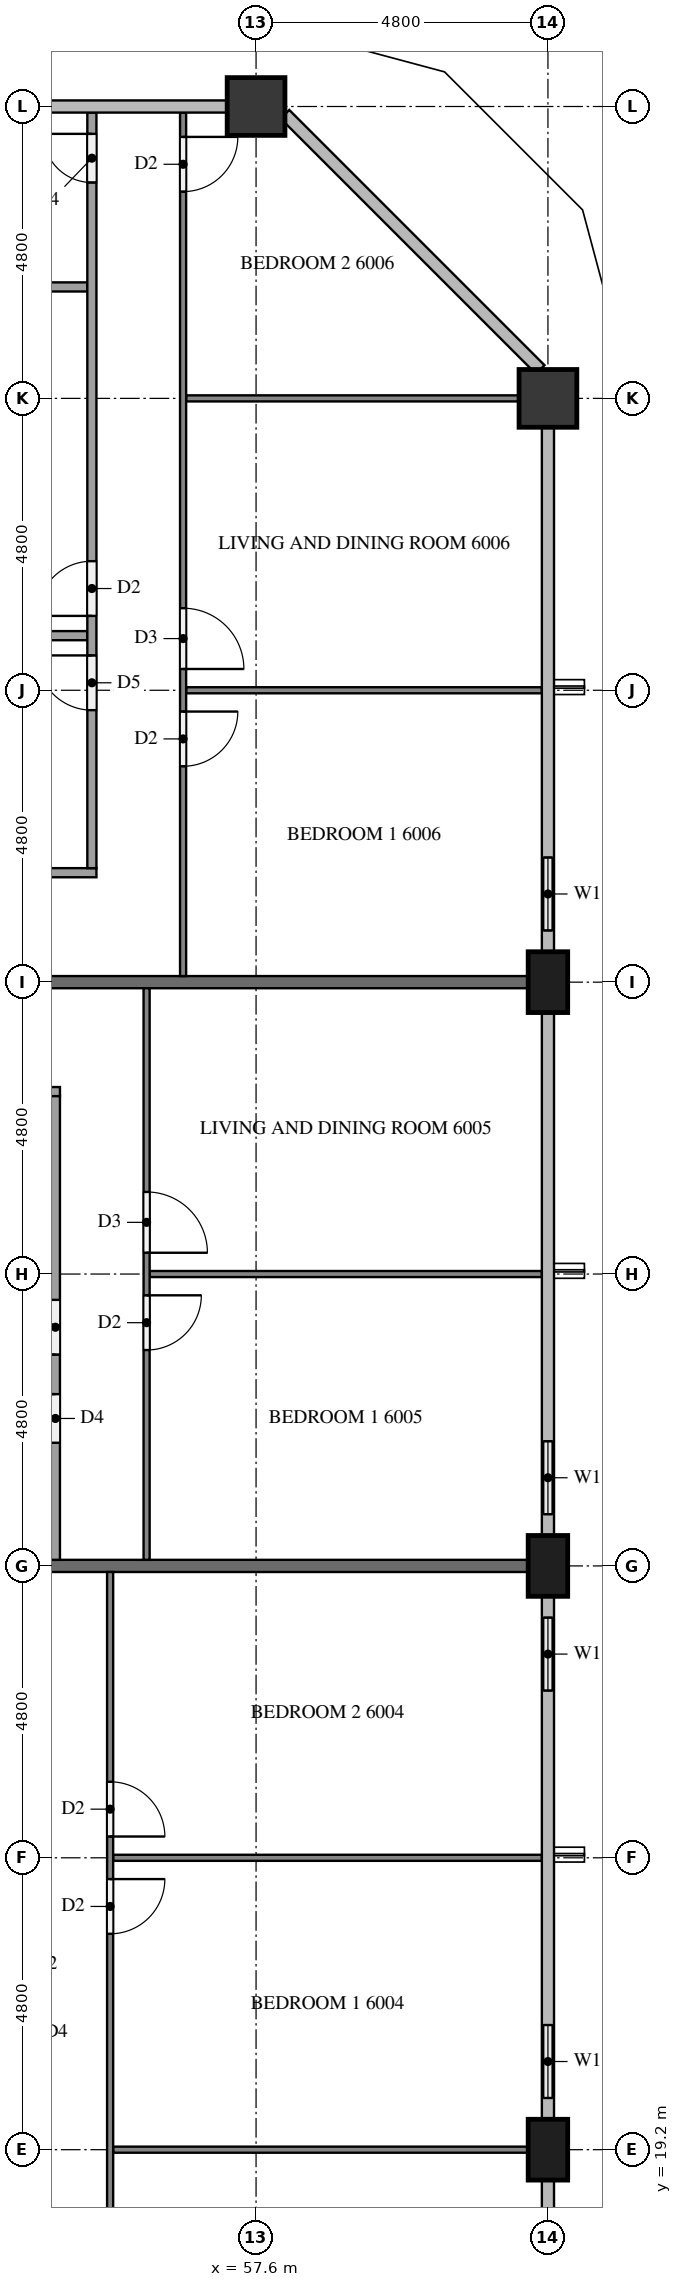
"""IFC4 building model, lengths in metres.
Left out: names, types, materials, properties, quantities, classifications, styles, units other than length and angle.
Written with IfcOpenShell. Run it as: python <this file> out.ifc"""

import sys

from ifc_helpers import new_model, si_unit, direction, frame, frame_2d, origin, origin_2d, place, context, subcontext, project, spatial, rectangle, extrude, element, fill, save


model = new_model("IFC4")
c1 = context("Model", 3, precision=1e-05, world=origin(), true_north=direction((0.0, 1.0)))
c2 = subcontext(c1, "Body", "Model", "MODEL_VIEW")
j1 = project(units=[si_unit("LENGTHUNIT", "METRE"), si_unit("PLANEANGLEUNIT", "RADIAN")], contexts=[c1])
p1 = place(None, origin())
s1 = spatial("IfcSite", under=j1, at=p1, CompositionType="ELEMENT")
p2 = place(p1, origin())
s2 = spatial("IfcBuilding", under=s1, at=p2, CompositionType="ELEMENT")
p3 = place(p2, frame((0.0, 0.0, 229.8)))
s3 = spatial("IfcBuildingStorey", under=s2, at=p3, CompositionType="ELEMENT", Elevation=229.8)
for number, where, z_axis, x_axis in (
    (1, (62.4, 19.2, 0.0), (0.0, 0.0, 1.0), (0.0, 1.0, 0.0)),
    (2, (62.4, 28.8, 0.0), (0.0, 0.0, 1.0), (0.0, 1.0, 0.0)),
    (3, (62.4, 38.4, 0.0), (0.0, 0.0, 1.0), (0.0, 1.0, 0.0)),
):
    element("IfcColumn", number, at=place(p3, frame(where, z_axis=z_axis, x_axis=x_axis)), inside=s3, PredefinedType="COLUMN", context=c2, shape_type="SweptSolid", body=[
        extrude(rectangle(XDim=1.0, YDim=0.65, at=origin_2d()), origin(), (0.0, 0.0, 1.0), 3.1),
    ])
for number, where, z_axis, x_axis in (
    (4, (62.4, 48.0, 0.0), (0.0, 0.0, 1.0), (1.0, 0.0, 0.0)),
    (5, (57.6, 52.8, 0.0), (0.0, 0.0, 1.0), (1.0, 0.0, 0.0)),
):
    element("IfcColumn", number, at=place(p3, frame(where, z_axis=z_axis, x_axis=x_axis)), inside=s3, PredefinedType="COLUMN", context=c2, shape_type="SweptSolid", body=[
        extrude(rectangle(XDim=0.95, YDim=0.95, at=origin_2d()), origin(), (0.0, 0.0, 1.0), 3.1),
    ])
p4 = place(p3, frame((62.4, 19.7, 0.0), z_axis=(0.0, 0.0, 1.0), x_axis=(0.0, 1.0, 0.0)))
e6 = element("IfcWall", 6, at=p4, inside=s3, PredefinedType="SOLIDWALL", context=c2, shape_type="SweptSolid", body=[
    extrude(rectangle(XDim=1.9, YDim=0.15, at=frame_2d((0.95, 0.0))), origin(), (0.0, 0.0, 1.0), 3.1),
])
p5 = place(p4, frame((0.35, 0.0, 0.9)))
e7 = element("IfcOpeningElement", 7, at=p5, cuts=e6, PredefinedType="OPENING", context=c2, shape_type="SweptSolid", body=[
    extrude(rectangle(XDim=1.2, YDim=1.4, at=frame_2d((0.6, 0.7))), frame((0.0, 0.085, 0.0), z_axis=(0.0, -1.0, 0.0), x_axis=(1.0, 0.0, 0.0)), (0.0, 0.0, 1.0), 0.17),
])
p6 = place(p3, frame((62.4, 26.4, 0.0), z_axis=(0.0, 0.0, 1.0), x_axis=(0.0, 1.0, 0.0)))
e8 = element("IfcWall", 8, at=p6, inside=s3, PredefinedType="SOLIDWALL", context=c2, shape_type="SweptSolid", body=[
    extrude(rectangle(XDim=1.9, YDim=0.15, at=frame_2d((0.95, 0.0))), origin(), (0.0, 0.0, 1.0), 3.1),
])
p7 = place(p6, frame((0.35, 0.0, 0.9)))
e9 = element("IfcOpeningElement", 9, at=p7, cuts=e8, PredefinedType="OPENING", context=c2, shape_type="SweptSolid", body=[
    extrude(rectangle(XDim=1.2, YDim=1.4, at=frame_2d((0.6, 0.7))), frame((0.0, 0.085, 0.0), z_axis=(0.0, -1.0, 0.0), x_axis=(1.0, 0.0, 0.0)), (0.0, 0.0, 1.0), 0.17),
])
p8 = place(p3, frame((62.4, 29.3, 0.0), z_axis=(0.0, 0.0, 1.0), x_axis=(0.0, 1.0, 0.0)))
e10 = element("IfcWall", 10, at=p8, inside=s3, PredefinedType="SOLIDWALL", context=c2, shape_type="SweptSolid", body=[
    extrude(rectangle(XDim=1.9, YDim=0.15, at=frame_2d((0.95, 0.0))), origin(), (0.0, 0.0, 1.0), 3.1),
])
p9 = place(p8, frame((0.35, 0.0, 0.9)))
e11 = element("IfcOpeningElement", 11, at=p9, cuts=e10, PredefinedType="OPENING", context=c2, shape_type="SweptSolid", body=[
    extrude(rectangle(XDim=1.2, YDim=1.4, at=frame_2d((0.6, 0.7))), frame((0.0, 0.085, 0.0), z_axis=(0.0, -1.0, 0.0), x_axis=(1.0, 0.0, 0.0)), (0.0, 0.0, 1.0), 0.17),
])
p10 = place(p3, frame((62.4, 38.9, 0.0), z_axis=(0.0, 0.0, 1.0), x_axis=(0.0, 1.0, 0.0)))
e12 = element("IfcWall", 12, at=p10, inside=s3, PredefinedType="SOLIDWALL", context=c2, shape_type="SweptSolid", body=[
    extrude(rectangle(XDim=1.9, YDim=0.15, at=frame_2d((0.95, 0.0))), origin(), (0.0, 0.0, 1.0), 3.1),
])
p11 = place(p10, frame((0.35, 0.0, 0.9)))
e13 = element("IfcOpeningElement", 13, at=p11, cuts=e12, PredefinedType="OPENING", context=c2, shape_type="SweptSolid", body=[
    extrude(rectangle(XDim=1.2, YDim=1.4, at=frame_2d((0.6, 0.7))), frame((0.0, 0.085, 0.0), z_axis=(0.0, -1.0, 0.0), x_axis=(1.0, 0.0, 0.0)), (0.0, 0.0, 1.0), 0.17),
])
for number, where, z_axis, x_axis in (
    (14, (50.5, 28.8, 0.0), (0.0, 0.0, 1.0), (1.0, 0.0, 0.0)),
    (15, (50.5, 38.4, 0.0), (0.0, 0.0, 1.0), (1.0, 0.0, 0.0)),
):
    element("IfcWall", number, at=place(p3, frame(where, z_axis=z_axis, x_axis=x_axis)), inside=s3, PredefinedType="PARTITIONING", context=c2, shape_type="SweptSolid", body=[
        extrude(rectangle(XDim=11.575, YDim=0.2, at=frame_2d((5.788, 0.0))), origin(), (0.0, 0.0, 1.0), 3.1),
    ])
p12 = place(p3, frame((55.25, 19.2, 0.0), z_axis=(0.0, 0.0, 1.0), x_axis=(1.0, 0.0, 0.0)))
e16 = element("IfcWall", 16, at=p12, inside=s3, PredefinedType="PARTITIONING", context=c2, shape_type="SweptSolid", body=[
    extrude(rectangle(XDim=6.825, YDim=0.1, at=frame_2d((3.413, 0.0))), origin(), (0.0, 0.0, 1.0), 3.1),
])
p13 = place(p3, frame((55.25, 24.0, 0.0), z_axis=(0.0, 0.0, 1.0), x_axis=(1.0, 0.0, 0.0)))
e17 = element("IfcWall", 17, at=p13, inside=s3, PredefinedType="PARTITIONING", context=c2, shape_type="SweptSolid", body=[
    extrude(rectangle(XDim=7.05, YDim=0.1, at=frame_2d((3.525, 0.0))), origin(), (0.0, 0.0, 1.0), 3.1),
])
p14 = place(p3, frame((55.2, 28.7, 0.0), z_axis=(0.0, 0.0, 1.0), x_axis=(0.0, -1.0, 0.0)))
e18 = element("IfcWall", 18, at=p14, inside=s3, PredefinedType="PARTITIONING", context=c2, shape_type="SweptSolid", body=[
    extrude(rectangle(XDim=16.6, YDim=0.1, at=frame_2d((8.3, 0.0))), origin(), (0.0, 0.0, 1.0), 3.1),
])
p15 = place(p14, frame((15.3, 0.0, 0.0)))
e19 = element("IfcOpeningElement", 19, at=p15, cuts=e18, PredefinedType="OPENING", context=c2, shape_type="SweptSolid", body=[
    extrude(rectangle(XDim=1.0, YDim=2.1, at=frame_2d((0.5, 1.05))), frame((0.0, 0.06, 0.0), z_axis=(0.0, -1.0, 0.0), x_axis=(1.0, 0.0, 0.0)), (0.0, 0.0, 1.0), 0.12),
])
p16 = place(p14, frame((5.05, 0.0, 0.0)))
e20 = element("IfcOpeningElement", 20, at=p16, cuts=e18, PredefinedType="OPENING", context=c2, shape_type="SweptSolid", body=[
    extrude(rectangle(XDim=0.9, YDim=2.1, at=frame_2d((0.45, 1.05))), frame((0.0, 0.06, 0.0), z_axis=(0.0, -1.0, 0.0), x_axis=(1.0, 0.0, 0.0)), (0.0, 0.0, 1.0), 0.12),
])
p17 = place(p14, frame((3.45, 0.0, 0.0)))
e21 = element("IfcOpeningElement", 21, at=p17, cuts=e18, PredefinedType="OPENING", context=c2, shape_type="SweptSolid", body=[
    extrude(rectangle(XDim=0.9, YDim=2.1, at=frame_2d((0.45, 1.05))), frame((0.0, 0.06, 0.0), z_axis=(0.0, -1.0, 0.0), x_axis=(1.0, 0.0, 0.0)), (0.0, 0.0, 1.0), 0.12),
])
p18 = place(p3, frame((55.85, 33.6, 0.0), z_axis=(0.0, 0.0, 1.0), x_axis=(1.0, 0.0, 0.0)))
e22 = element("IfcWall", 22, at=p18, inside=s3, PredefinedType="PARTITIONING", context=c2, shape_type="SweptSolid", body=[
    extrude(rectangle(XDim=6.45, YDim=0.1, at=frame_2d((3.225, 0.0))), origin(), (0.0, 0.0, 1.0), 3.1),
])
p19 = place(p3, frame((55.8, 38.3, 0.0), z_axis=(0.0, 0.0, 1.0), x_axis=(0.0, -1.0, 0.0)))
e23 = element("IfcWall", 23, at=p19, inside=s3, PredefinedType="PARTITIONING", context=c2, shape_type="SweptSolid", body=[
    extrude(rectangle(XDim=9.4, YDim=0.1, at=frame_2d((4.7, 0.0))), origin(), (0.0, 0.0, 1.0), 3.1),
])
p20 = place(p19, frame((3.35, 0.0, 0.0)))
e24 = element("IfcOpeningElement", 24, at=p20, cuts=e23, PredefinedType="OPENING", context=c2, shape_type="SweptSolid", body=[
    extrude(rectangle(XDim=1.0, YDim=2.1, at=frame_2d((0.5, 1.05))), frame((0.0, 0.06, 0.0), z_axis=(0.0, -1.0, 0.0), x_axis=(1.0, 0.0, 0.0)), (0.0, 0.0, 1.0), 0.12),
])
p21 = place(p19, frame((5.05, 0.0, 0.0)))
e25 = element("IfcOpeningElement", 25, at=p21, cuts=e23, PredefinedType="OPENING", context=c2, shape_type="SweptSolid", body=[
    extrude(rectangle(XDim=0.9, YDim=2.1, at=frame_2d((0.45, 1.05))), frame((0.0, 0.06, 0.0), z_axis=(0.0, -1.0, 0.0), x_axis=(1.0, 0.0, 0.0)), (0.0, 0.0, 1.0), 0.12),
])
p22 = place(p3, frame((50.5, 36.6, 0.0), z_axis=(0.0, 0.0, 1.0), x_axis=(1.0, 0.0, 0.0)))
e26 = element("IfcWall", 26, at=p22, inside=s3, PredefinedType="PARTITIONING", context=c2, shape_type="SweptSolid", body=[
    extrude(rectangle(XDim=3.875, YDim=0.15, at=frame_2d((1.938, 0.0))), origin(), (0.0, 0.0, 1.0), 3.1),
])
p23 = place(p3, frame((54.3, 28.9, 0.0), z_axis=(0.0, 0.0, 1.0), x_axis=(0.0, 1.0, 0.0)))
e27 = element("IfcWall", 27, at=p23, inside=s3, PredefinedType="PARTITIONING", context=c2, shape_type="SweptSolid", body=[
    extrude(rectangle(XDim=7.625, YDim=0.15, at=frame_2d((3.812, 0.0))), origin(), (0.0, 0.0, 1.0), 3.1),
])
p24 = place(p23, frame((3.375, 0.0, 0.0)))
e28 = element("IfcOpeningElement", 28, at=p24, cuts=e27, PredefinedType="OPENING", context=c2, shape_type="SweptSolid", body=[
    extrude(rectangle(XDim=0.9, YDim=2.1, at=frame_2d((0.45, 1.05))), frame((0.0, 0.085, 0.0), z_axis=(0.0, -1.0, 0.0), x_axis=(1.0, 0.0, 0.0)), (0.0, 0.0, 1.0), 0.17),
])
p25 = place(p23, frame((1.925, 0.0, 0.0)))
e29 = element("IfcOpeningElement", 29, at=p25, cuts=e27, PredefinedType="OPENING", context=c2, shape_type="SweptSolid", body=[
    extrude(rectangle(XDim=0.8, YDim=2.1, at=frame_2d((0.4, 1.05))), frame((0.0, 0.085, 0.0), z_axis=(0.0, -1.0, 0.0), x_axis=(1.0, 0.0, 0.0)), (0.0, 0.0, 1.0), 0.17),
])
p26 = place(p3, frame((56.45, 43.2, 0.0), z_axis=(0.0, 0.0, 1.0), x_axis=(1.0, 0.0, 0.0)))
e30 = element("IfcWall", 30, at=p26, inside=s3, PredefinedType="PARTITIONING", context=c2, shape_type="SweptSolid", body=[
    extrude(rectangle(XDim=5.85, YDim=0.1, at=frame_2d((2.925, 0.0))), origin(), (0.0, 0.0, 1.0), 3.1),
])
p27 = place(p3, frame((56.45, 48.0, 0.0), z_axis=(0.0, 0.0, 1.0), x_axis=(1.0, 0.0, 0.0)))
e31 = element("IfcWall", 31, at=p27, inside=s3, PredefinedType="PARTITIONING", context=c2, shape_type="SweptSolid", body=[
    extrude(rectangle(XDim=5.475, YDim=0.1, at=frame_2d((2.738, 0.0))), origin(), (0.0, 0.0, 1.0), 3.1),
])
p28 = place(p3, frame((56.4, 52.7, 0.0), z_axis=(0.0, 0.0, 1.0), x_axis=(0.0, -1.0, 0.0)))
e32 = element("IfcWall", 32, at=p28, inside=s3, PredefinedType="PARTITIONING", context=c2, shape_type="SweptSolid", body=[
    extrude(rectangle(XDim=14.2, YDim=0.1, at=frame_2d((7.1, 0.0))), origin(), (0.0, 0.0, 1.0), 3.1),
])
p29 = place(p28, frame((9.85, 0.0, 0.0)))
e33 = element("IfcOpeningElement", 33, at=p29, cuts=e32, PredefinedType="OPENING", context=c2, shape_type="SweptSolid", body=[
    extrude(rectangle(XDim=0.9, YDim=2.1, at=frame_2d((0.45, 1.05))), frame((0.0, 0.06, 0.0), z_axis=(0.0, -1.0, 0.0), x_axis=(1.0, 0.0, 0.0)), (0.0, 0.0, 1.0), 0.12),
])
p30 = place(p28, frame((8.15, 0.0, 0.0)))
e34 = element("IfcOpeningElement", 34, at=p30, cuts=e32, PredefinedType="OPENING", context=c2, shape_type="SweptSolid", body=[
    extrude(rectangle(XDim=1.0, YDim=2.1, at=frame_2d((0.5, 1.05))), frame((0.0, 0.06, 0.0), z_axis=(0.0, -1.0, 0.0), x_axis=(1.0, 0.0, 0.0)), (0.0, 0.0, 1.0), 0.12),
])
p31 = place(p28, frame((0.4, 0.0, 0.0)))
e35 = element("IfcOpeningElement", 35, at=p31, cuts=e32, PredefinedType="OPENING", context=c2, shape_type="SweptSolid", body=[
    extrude(rectangle(XDim=0.9, YDim=2.1, at=frame_2d((0.45, 1.05))), frame((0.0, 0.06, 0.0), z_axis=(0.0, -1.0, 0.0), x_axis=(1.0, 0.0, 0.0)), (0.0, 0.0, 1.0), 0.12),
])
for number, where, z_axis, x_axis in (
    (36, (50.5, 44.098, 0.0), (0.0, 0.0, 1.0), (1.0, 0.0, 0.0)),
    (37, (50.5, 49.833, 0.0), (0.0, 0.0, 1.0), (1.0, 0.0, 0.0)),
):
    element("IfcWall", number, at=place(p3, frame(where, z_axis=z_axis, x_axis=x_axis)), inside=s3, PredefinedType="PARTITIONING", context=c2, shape_type="SweptSolid", body=[
        extrude(rectangle(XDim=4.325, YDim=0.15, at=frame_2d((2.163, 0.0))), origin(), (0.0, 0.0, 1.0), 3.1),
    ])
p32 = place(p3, frame((50.5, 40.2, 0.0), z_axis=(0.0, 0.0, 1.0), x_axis=(1.0, 0.0, 0.0)))
e38 = element("IfcWall", 38, at=p32, inside=s3, PredefinedType="PARTITIONING", context=c2, shape_type="SweptSolid", body=[
    extrude(rectangle(XDim=4.475, YDim=0.15, at=frame_2d((2.238, 0.0))), origin(), (0.0, 0.0, 1.0), 3.1),
])
p33 = place(p3, frame((54.9, 40.275, 0.0), z_axis=(0.0, 0.0, 1.0), x_axis=(0.0, 1.0, 0.0)))
e39 = element("IfcWall", 39, at=p33, inside=s3, PredefinedType="PARTITIONING", context=c2, shape_type="SweptSolid", body=[
    extrude(rectangle(XDim=12.425, YDim=0.15, at=frame_2d((6.212, 0.0))), origin(), (0.0, 0.0, 1.0), 3.1),
])
p34 = place(p33, frame((2.598, 0.0, 0.0)))
e40 = element("IfcOpeningElement", 40, at=p34, cuts=e39, PredefinedType="OPENING", context=c2, shape_type="SweptSolid", body=[
    extrude(rectangle(XDim=0.9, YDim=2.1, at=frame_2d((0.45, 1.05))), frame((0.0, 0.085, 0.0), z_axis=(0.0, -1.0, 0.0), x_axis=(1.0, 0.0, 0.0)), (0.0, 0.0, 1.0), 0.17),
])
p35 = place(p33, frame((4.148, 0.0, 0.0)))
e41 = element("IfcOpeningElement", 41, at=p35, cuts=e39, PredefinedType="OPENING", context=c2, shape_type="SweptSolid", body=[
    extrude(rectangle(XDim=0.9, YDim=2.1, at=frame_2d((0.45, 1.05))), frame((0.0, 0.085, 0.0), z_axis=(0.0, -1.0, 0.0), x_axis=(1.0, 0.0, 0.0)), (0.0, 0.0, 1.0), 0.17),
])
p36 = place(p33, frame((11.275, 0.0, 0.0)))
e42 = element("IfcOpeningElement", 42, at=p36, cuts=e39, PredefinedType="OPENING", context=c2, shape_type="SweptSolid", body=[
    extrude(rectangle(XDim=0.8, YDim=2.1, at=frame_2d((0.4, 1.05))), frame((0.0, 0.085, 0.0), z_axis=(0.0, -1.0, 0.0), x_axis=(1.0, 0.0, 0.0)), (0.0, 0.0, 1.0), 0.17),
])
p37 = place(p5, origin())
e43 = element("IfcWindow", 43, at=p37, inside=s3, PartitioningType="SINGLE_PANEL", PredefinedType="WINDOW", context=c2, shape_type="SweptSolid", body=[
    extrude(rectangle(XDim=1.2, YDim=1.4, at=frame_2d((0.6, 0.7))), frame((0.0, 0.03, 0.0), z_axis=(0.0, -1.0, 0.0), x_axis=(1.0, 0.0, 0.0)), (0.0, 0.0, 1.0), 0.06),
])
fill(e7, e43)
p38 = place(p7, origin())
e44 = element("IfcWindow", 44, at=p38, inside=s3, PartitioningType="SINGLE_PANEL", PredefinedType="WINDOW", context=c2, shape_type="SweptSolid", body=[
    extrude(rectangle(XDim=1.2, YDim=1.4, at=frame_2d((0.6, 0.7))), frame((0.0, 0.03, 0.0), z_axis=(0.0, -1.0, 0.0), x_axis=(1.0, 0.0, 0.0)), (0.0, 0.0, 1.0), 0.06),
])
fill(e9, e44)
p39 = place(p9, origin())
e45 = element("IfcWindow", 45, at=p39, inside=s3, PartitioningType="SINGLE_PANEL", PredefinedType="WINDOW", context=c2, shape_type="SweptSolid", body=[
    extrude(rectangle(XDim=1.2, YDim=1.4, at=frame_2d((0.6, 0.7))), frame((0.0, 0.03, 0.0), z_axis=(0.0, -1.0, 0.0), x_axis=(1.0, 0.0, 0.0)), (0.0, 0.0, 1.0), 0.06),
])
fill(e11, e45)
p40 = place(p11, origin())
e46 = element("IfcWindow", 46, at=p40, inside=s3, PartitioningType="SINGLE_PANEL", PredefinedType="WINDOW", context=c2, shape_type="SweptSolid", body=[
    extrude(rectangle(XDim=1.2, YDim=1.4, at=frame_2d((0.6, 0.7))), frame((0.0, 0.03, 0.0), z_axis=(0.0, -1.0, 0.0), x_axis=(1.0, 0.0, 0.0)), (0.0, 0.0, 1.0), 0.06),
])
fill(e13, e46)
p41 = place(p16, origin())
e47 = element("IfcDoor", 47, at=p41, inside=s3, OperationType="SINGLE_SWING_LEFT", PredefinedType="DOOR", context=c2, shape_type="SweptSolid", body=[
    extrude(rectangle(XDim=0.9, YDim=2.1, at=frame_2d((0.45, 1.05))), frame((0.0, 0.025, 0.0), z_axis=(0.0, -1.0, 0.0), x_axis=(1.0, 0.0, 0.0)), (0.0, 0.0, 1.0), 0.05),
])
fill(e20, e47)
p42 = place(p17, origin())
e48 = element("IfcDoor", 48, at=p42, inside=s3, OperationType="SINGLE_SWING_RIGHT", PredefinedType="DOOR", context=c2, shape_type="SweptSolid", body=[
    extrude(rectangle(XDim=0.9, YDim=2.1, at=frame_2d((0.45, 1.05))), frame((0.0, 0.025, 0.0), z_axis=(0.0, -1.0, 0.0), x_axis=(1.0, 0.0, 0.0)), (0.0, 0.0, 1.0), 0.05),
])
fill(e21, e48)
p43 = place(p20, origin())
e49 = element("IfcDoor", 49, at=p43, inside=s3, OperationType="SINGLE_SWING_RIGHT", PredefinedType="DOOR", context=c2, shape_type="SweptSolid", body=[
    extrude(rectangle(XDim=1.0, YDim=2.1, at=frame_2d((0.5, 1.05))), frame((0.0, 0.025, 0.0), z_axis=(0.0, -1.0, 0.0), x_axis=(1.0, 0.0, 0.0)), (0.0, 0.0, 1.0), 0.05),
])
fill(e24, e49)
p44 = place(p21, origin())
e50 = element("IfcDoor", 50, at=p44, inside=s3, OperationType="SINGLE_SWING_LEFT", PredefinedType="DOOR", context=c2, shape_type="SweptSolid", body=[
    extrude(rectangle(XDim=0.9, YDim=2.1, at=frame_2d((0.45, 1.05))), frame((0.0, 0.025, 0.0), z_axis=(0.0, -1.0, 0.0), x_axis=(1.0, 0.0, 0.0)), (0.0, 0.0, 1.0), 0.05),
])
fill(e25, e50)
p45 = place(p24, origin())
e51 = element("IfcDoor", 51, at=p45, inside=s3, OperationType="SINGLE_SWING_LEFT", PredefinedType="DOOR", context=c2, shape_type="SweptSolid", body=[
    extrude(rectangle(XDim=0.9, YDim=2.1, at=frame_2d((0.45, 1.05))), frame((0.0, 0.025, 0.0), z_axis=(0.0, -1.0, 0.0), x_axis=(1.0, 0.0, 0.0)), (0.0, 0.0, 1.0), 0.05),
])
fill(e28, e51)
p46 = place(p25, origin())
e52 = element("IfcDoor", 52, at=p46, inside=s3, OperationType="SINGLE_SWING_RIGHT", PredefinedType="DOOR", context=c2, shape_type="SweptSolid", body=[
    extrude(rectangle(XDim=0.8, YDim=2.1, at=frame_2d((0.4, 1.05))), frame((0.0, 0.025, 0.0), z_axis=(0.0, -1.0, 0.0), x_axis=(1.0, 0.0, 0.0)), (0.0, 0.0, 1.0), 0.05),
])
fill(e29, e52)
p47 = place(p29, origin())
e53 = element("IfcDoor", 53, at=p47, inside=s3, OperationType="SINGLE_SWING_LEFT", PredefinedType="DOOR", context=c2, shape_type="SweptSolid", body=[
    extrude(rectangle(XDim=0.9, YDim=2.1, at=frame_2d((0.45, 1.05))), frame((0.0, 0.025, 0.0), z_axis=(0.0, -1.0, 0.0), x_axis=(1.0, 0.0, 0.0)), (0.0, 0.0, 1.0), 0.05),
])
fill(e33, e53)
p48 = place(p30, origin())
e54 = element("IfcDoor", 54, at=p48, inside=s3, OperationType="SINGLE_SWING_RIGHT", PredefinedType="DOOR", context=c2, shape_type="SweptSolid", body=[
    extrude(rectangle(XDim=1.0, YDim=2.1, at=frame_2d((0.5, 1.05))), frame((0.0, 0.025, 0.0), z_axis=(0.0, -1.0, 0.0), x_axis=(1.0, 0.0, 0.0)), (0.0, 0.0, 1.0), 0.05),
])
fill(e34, e54)
p49 = place(p31, origin())
e55 = element("IfcDoor", 55, at=p49, inside=s3, OperationType="SINGLE_SWING_LEFT", PredefinedType="DOOR", context=c2, shape_type="SweptSolid", body=[
    extrude(rectangle(XDim=0.9, YDim=2.1, at=frame_2d((0.45, 1.05))), frame((0.0, 0.025, 0.0), z_axis=(0.0, -1.0, 0.0), x_axis=(1.0, 0.0, 0.0)), (0.0, 0.0, 1.0), 0.05),
])
fill(e35, e55)
p50 = place(p34, origin())
e56 = element("IfcDoor", 56, at=p50, inside=s3, OperationType="SINGLE_SWING_RIGHT", PredefinedType="DOOR", context=c2, shape_type="SweptSolid", body=[
    extrude(rectangle(XDim=0.9, YDim=2.1, at=frame_2d((0.45, 1.05))), frame((0.0, 0.025, 0.0), z_axis=(0.0, -1.0, 0.0), x_axis=(1.0, 0.0, 0.0)), (0.0, 0.0, 1.0), 0.05),
])
fill(e40, e56)
p51 = place(p35, origin())
e57 = element("IfcDoor", 57, at=p51, inside=s3, OperationType="SINGLE_SWING_LEFT", PredefinedType="DOOR", context=c2, shape_type="SweptSolid", body=[
    extrude(rectangle(XDim=0.9, YDim=2.1, at=frame_2d((0.45, 1.05))), frame((0.0, 0.025, 0.0), z_axis=(0.0, -1.0, 0.0), x_axis=(1.0, 0.0, 0.0)), (0.0, 0.0, 1.0), 0.05),
])
fill(e41, e57)
p52 = place(p36, origin())
e58 = element("IfcDoor", 58, at=p52, inside=s3, OperationType="SINGLE_SWING_RIGHT", PredefinedType="DOOR", context=c2, shape_type="SweptSolid", body=[
    extrude(rectangle(XDim=0.8, YDim=2.1, at=frame_2d((0.4, 1.05))), frame((0.0, 0.025, 0.0), z_axis=(0.0, -1.0, 0.0), x_axis=(1.0, 0.0, 0.0)), (0.0, 0.0, 1.0), 0.05),
])
fill(e42, e58)
save(model, sys.argv[1])
